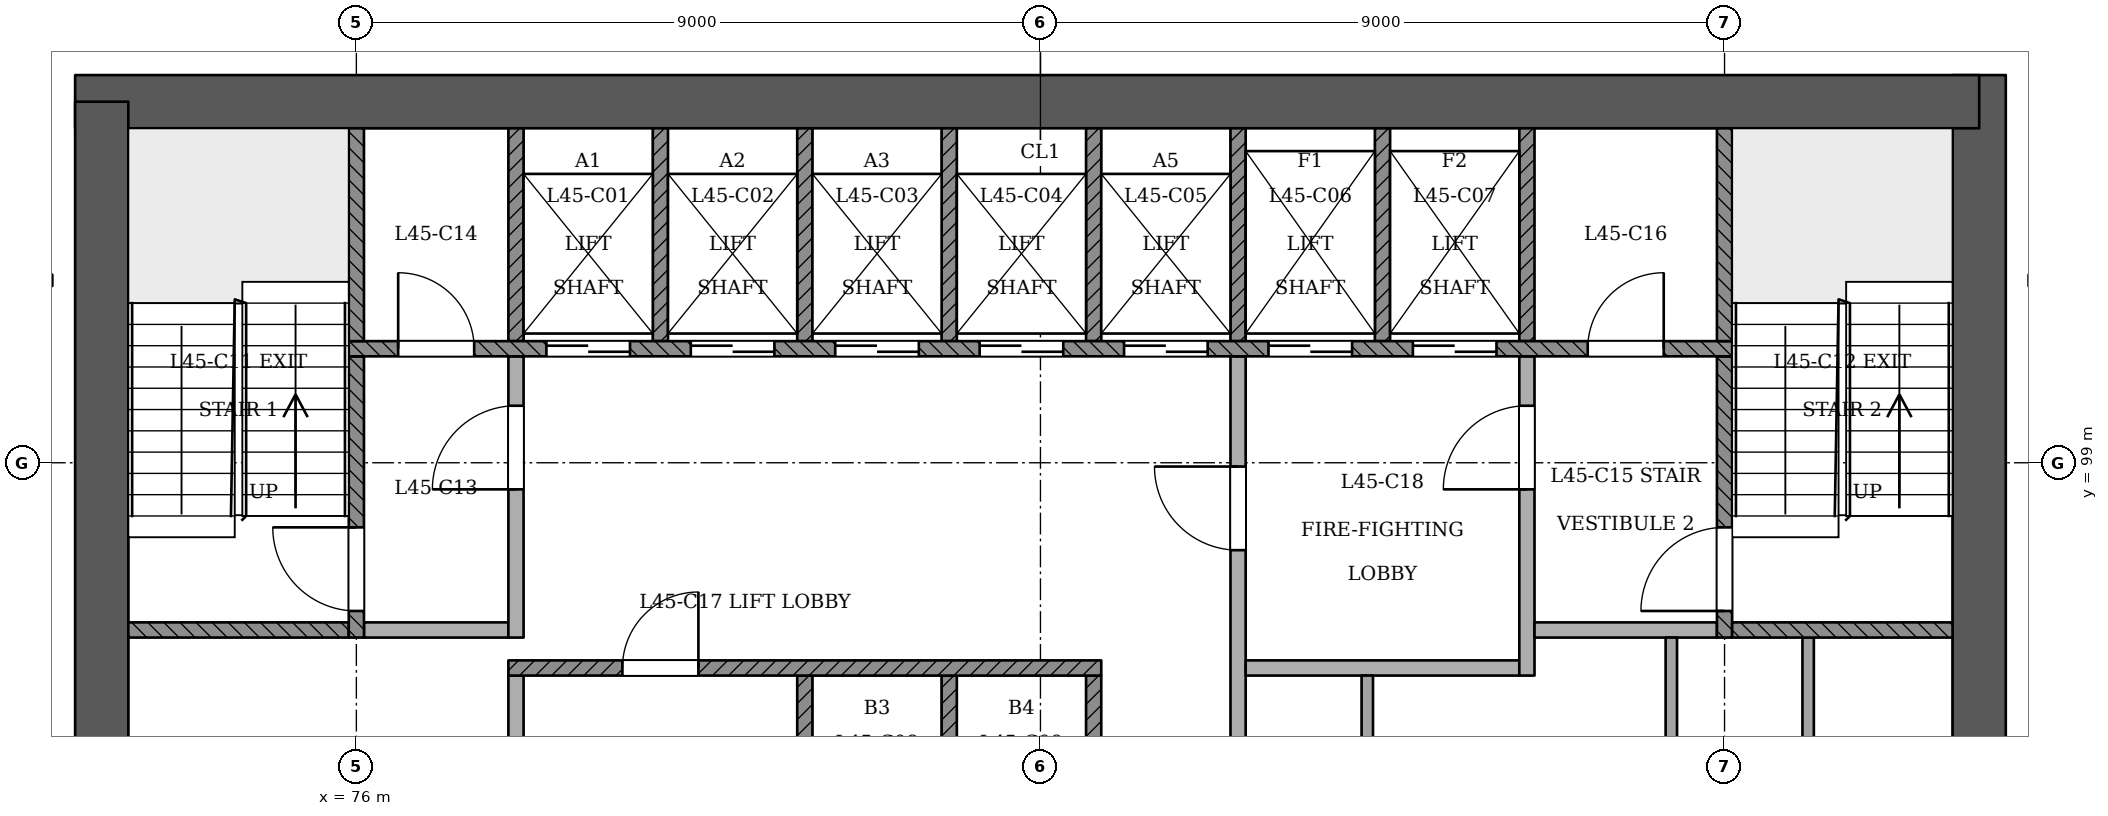
"""IFC4 building model, lengths in metres.
Left out: names, types, materials, properties, quantities, classifications, styles, units other than length and angle.
Written with IfcOpenShell. Run it as: python <this file> out.ifc"""

import sys

from ifc_helpers import new_model, si_unit, direction, frame, frame_2d, origin, place, context, subcontext, project, spatial, rectangle, extrude, element, fill, save


model = new_model("IFC4")
c1 = context("Model", 3, precision=1e-05, world=origin(), true_north=direction((0.0, 1.0)))
c2 = subcontext(c1, "Body", "Model", "MODEL_VIEW")
j1 = project(units=[si_unit("LENGTHUNIT", "METRE"), si_unit("PLANEANGLEUNIT", "RADIAN")], contexts=[c1])
p1 = place(None, origin())
s1 = spatial("IfcSite", under=j1, at=p1, CompositionType="ELEMENT")
p2 = place(p1, origin())
s2 = spatial("IfcBuilding", under=s1, at=p2, CompositionType="ELEMENT")
p3 = place(p2, frame((0.0, 0.0, 174.6)))
s3 = spatial("IfcBuildingStorey", under=s2, at=p3, CompositionType="ELEMENT", Elevation=174.6)
p4 = place(p3, frame((97.35, 93.05, 0.0), z_axis=(0.0, 0.0, 1.0), x_axis=(0.0, 1.0, 0.0)))
e1 = element("IfcWall", 1, at=p4, inside=s3, PredefinedType="SHEAR", context=c2, shape_type="SweptSolid", body=[
    extrude(rectangle(XDim=11.05, YDim=0.7, at=frame_2d((5.525, 0.0))), origin(), (0.0, 0.0, 1.0), 3.6),
])
p5 = place(p3, frame((97.35, 103.75, 0.0), z_axis=(0.0, 0.0, 1.0), x_axis=(-1.0, 0.0, 0.0)))
e2 = element("IfcWall", 2, at=p5, inside=s3, PredefinedType="SHEAR", context=c2, shape_type="SweptSolid", body=[
    extrude(rectangle(XDim=25.05, YDim=0.7, at=frame_2d((12.525, 0.0))), origin(), (0.0, 0.0, 1.0), 3.6),
])
p6 = place(p3, frame((72.65, 103.75, 0.0), z_axis=(0.0, 0.0, 1.0), x_axis=(0.0, -1.0, 0.0)))
e3 = element("IfcWall", 3, at=p6, inside=s3, PredefinedType="SHEAR", context=c2, shape_type="SweptSolid", body=[
    extrude(rectangle(XDim=11.05, YDim=0.7, at=frame_2d((5.525, 0.0))), origin(), (0.0, 0.0, 1.0), 3.6),
])
p7 = place(p3, frame((78.1, 93.4, 0.0), z_axis=(0.0, 0.0, 1.0), x_axis=(0.0, 1.0, 0.0)))
e4 = element("IfcWall", 4, at=p7, inside=s3, PredefinedType="PARTITIONING", context=c2, shape_type="SweptSolid", body=[
    extrude(rectangle(XDim=2.8, YDim=0.2, at=frame_2d((1.4, 0.0))), origin(), (0.0, 0.0, 1.0), 3.15),
])
for number, where, z_axis, x_axis in (
    (5, (81.9, 93.4, 0.0), (0.0, 0.0, 1.0), (0.0, 1.0, 0.0)),
    (6, (83.8, 93.4, 0.0), (0.0, 0.0, 1.0), (0.0, 1.0, 0.0)),
    (7, (85.7, 93.4, 0.0), (0.0, 0.0, 1.0), (0.0, 1.0, 0.0)),
):
    element("IfcWall", number, at=place(p3, frame(where, z_axis=z_axis, x_axis=x_axis)), inside=s3, PredefinedType="SOLIDWALL", context=c2, shape_type="SweptSolid", body=[
        extrude(rectangle(XDim=2.8, YDim=0.2, at=frame_2d((1.4, 0.0))), origin(), (0.0, 0.0, 1.0), 3.15),
    ])
p8 = place(p3, frame((87.6, 93.4, 0.0), z_axis=(0.0, 0.0, 1.0), x_axis=(0.0, 1.0, 0.0)))
e8 = element("IfcWall", 8, at=p8, inside=s3, PredefinedType="PARTITIONING", context=c2, shape_type="SweptSolid", body=[
    extrude(rectangle(XDim=7.0, YDim=0.2, at=frame_2d((3.5, 0.0))), origin(), (0.0, 0.0, 1.0), 3.15),
])
p9 = place(p8, frame((4.45, 0.0, 0.0)))
e9 = element("IfcOpeningElement", 9, at=p9, cuts=e8, PredefinedType="OPENING", context=c2, shape_type="SweptSolid", body=[
    extrude(rectangle(XDim=1.1, YDim=2.1, at=frame_2d((0.55, 1.05))), frame((0.0, 0.11, 0.0), z_axis=(0.0, -1.0, 0.0), x_axis=(1.0, 0.0, 0.0)), (0.0, 0.0, 1.0), 0.221),
])
p10 = place(p3, frame((89.3, 93.4, 0.0), z_axis=(0.0, 0.0, 1.0), x_axis=(0.0, 1.0, 0.0)))
e10 = element("IfcWall", 10, at=p10, inside=s3, PredefinedType="PARTITIONING", context=c2, shape_type="SweptSolid", body=[
    extrude(rectangle(XDim=2.8, YDim=0.15, at=frame_2d((1.4, 0.0))), origin(), (0.0, 0.0, 1.0), 3.15),
])
for number, where, z_axis, x_axis in (
    (11, (93.3, 93.4, 0.0), (0.0, 0.0, 1.0), (0.0, 1.0, 0.0)),
    (12, (95.1, 93.4, 0.0), (0.0, 0.0, 1.0), (0.0, 1.0, 0.0)),
):
    element("IfcWall", number, at=place(p3, frame(where, z_axis=z_axis, x_axis=x_axis)), inside=s3, PredefinedType="PARTITIONING", context=c2, shape_type="SweptSolid", body=[
        extrude(rectangle(XDim=3.3, YDim=0.15, at=frame_2d((1.65, 0.0))), origin(), (0.0, 0.0, 1.0), 3.15),
    ])
p11 = place(p3, frame((78.0, 96.3, 0.0), z_axis=(0.0, 0.0, 1.0), x_axis=(1.0, 0.0, 0.0)))
e13 = element("IfcWall", 13, at=p11, inside=s3, PredefinedType="SOLIDWALL", context=c2, shape_type="SweptSolid", body=[
    extrude(rectangle(XDim=7.8, YDim=0.2, at=frame_2d((3.9, 0.0))), origin(), (0.0, 0.0, 1.0), 3.15),
])
p12 = place(p11, frame((1.5, 0.0, 0.0)))
e14 = element("IfcOpeningElement", 14, at=p12, cuts=e13, PredefinedType="OPENING", context=c2, shape_type="SweptSolid", body=[
    extrude(rectangle(XDim=1.0, YDim=2.1, at=frame_2d((0.5, 1.05))), frame((0.0, 0.11, 0.0), z_axis=(0.0, -1.0, 0.0), x_axis=(1.0, 0.0, 0.0)), (0.0, 0.0, 1.0), 0.221),
])
p13 = place(p3, frame((87.7, 96.3, 0.0), z_axis=(0.0, 0.0, 1.0), x_axis=(1.0, 0.0, 0.0)))
e15 = element("IfcWall", 15, at=p13, inside=s3, PredefinedType="PARTITIONING", context=c2, shape_type="SweptSolid", body=[
    extrude(rectangle(XDim=3.6, YDim=0.2, at=frame_2d((1.8, 0.0))), origin(), (0.0, 0.0, 1.0), 3.15),
])
p14 = place(p3, frame((91.4, 96.2, 0.0), z_axis=(0.0, 0.0, 1.0), x_axis=(0.0, 1.0, 0.0)))
e16 = element("IfcWall", 16, at=p14, inside=s3, PredefinedType="PARTITIONING", context=c2, shape_type="SweptSolid", body=[
    extrude(rectangle(XDim=4.2, YDim=0.2, at=frame_2d((2.1, 0.0))), origin(), (0.0, 0.0, 1.0), 3.15),
])
p15 = place(p14, frame((2.45, 0.0, 0.0)))
e17 = element("IfcOpeningElement", 17, at=p15, cuts=e16, PredefinedType="OPENING", context=c2, shape_type="SweptSolid", body=[
    extrude(rectangle(XDim=1.1, YDim=2.1, at=frame_2d((0.55, 1.05))), frame((0.0, 0.11, 0.0), z_axis=(0.0, -1.0, 0.0), x_axis=(1.0, 0.0, 0.0)), (0.0, 0.0, 1.0), 0.221),
])
p16 = place(p3, frame((73.0, 96.8, 0.0), z_axis=(0.0, 0.0, 1.0), x_axis=(1.0, 0.0, 0.0)))
e18 = element("IfcWall", 18, at=p16, inside=s3, PredefinedType="SOLIDWALL", context=c2, shape_type="SweptSolid", body=[
    extrude(rectangle(XDim=2.9, YDim=0.2, at=frame_2d((1.45, 0.0))), origin(), (0.0, 0.0, 1.0), 3.15),
])
p17 = place(p3, frame((76.0, 96.7, 0.0), z_axis=(0.0, 0.0, 1.0), x_axis=(0.0, 1.0, 0.0)))
e19 = element("IfcWall", 19, at=p17, inside=s3, PredefinedType="SOLIDWALL", context=c2, shape_type="SweptSolid", body=[
    extrude(rectangle(XDim=3.7, YDim=0.2, at=frame_2d((1.85, 0.0))), origin(), (0.0, 0.0, 1.0), 3.15),
])
p18 = place(p17, frame((0.35, 0.0, 0.0)))
e20 = element("IfcOpeningElement", 20, at=p18, cuts=e19, PredefinedType="OPENING", context=c2, shape_type="SweptSolid", body=[
    extrude(rectangle(XDim=1.1, YDim=2.1, at=frame_2d((0.55, 1.05))), frame((0.0, 0.11, 0.0), z_axis=(0.0, -1.0, 0.0), x_axis=(1.0, 0.0, 0.0)), (0.0, 0.0, 1.0), 0.221),
])
p19 = place(p3, frame((76.1, 96.8, 0.0), z_axis=(0.0, 0.0, 1.0), x_axis=(1.0, 0.0, 0.0)))
e21 = element("IfcWall", 21, at=p19, inside=s3, PredefinedType="PARTITIONING", context=c2, shape_type="SweptSolid", body=[
    extrude(rectangle(XDim=1.9, YDim=0.2, at=frame_2d((0.95, 0.0))), origin(), (0.0, 0.0, 1.0), 3.15),
])
p20 = place(p3, frame((78.1, 96.7, 0.0), z_axis=(0.0, 0.0, 1.0), x_axis=(0.0, 1.0, 0.0)))
e22 = element("IfcWall", 22, at=p20, inside=s3, PredefinedType="PARTITIONING", context=c2, shape_type="SweptSolid", body=[
    extrude(rectangle(XDim=3.7, YDim=0.2, at=frame_2d((1.85, 0.0))), origin(), (0.0, 0.0, 1.0), 3.15),
])
p21 = place(p20, frame((1.95, 0.0, 0.0)))
e23 = element("IfcOpeningElement", 23, at=p21, cuts=e22, PredefinedType="OPENING", context=c2, shape_type="SweptSolid", body=[
    extrude(rectangle(XDim=1.1, YDim=2.1, at=frame_2d((0.55, 1.05))), frame((0.0, 0.11, 0.0), z_axis=(0.0, -1.0, 0.0), x_axis=(1.0, 0.0, 0.0)), (0.0, 0.0, 1.0), 0.221),
])
p22 = place(p3, frame((91.5, 96.8, 0.0), z_axis=(0.0, 0.0, 1.0), x_axis=(1.0, 0.0, 0.0)))
e24 = element("IfcWall", 24, at=p22, inside=s3, PredefinedType="PARTITIONING", context=c2, shape_type="SweptSolid", body=[
    extrude(rectangle(XDim=2.4, YDim=0.2, at=frame_2d((1.2, 0.0))), origin(), (0.0, 0.0, 1.0), 3.15),
])
p23 = place(p3, frame((94.0, 96.7, 0.0), z_axis=(0.0, 0.0, 1.0), x_axis=(0.0, 1.0, 0.0)))
e25 = element("IfcWall", 25, at=p23, inside=s3, PredefinedType="SOLIDWALL", context=c2, shape_type="SweptSolid", body=[
    extrude(rectangle(XDim=3.7, YDim=0.2, at=frame_2d((1.85, 0.0))), origin(), (0.0, 0.0, 1.0), 3.15),
])
p24 = place(p23, frame((0.35, 0.0, 0.0)))
e26 = element("IfcOpeningElement", 26, at=p24, cuts=e25, PredefinedType="OPENING", context=c2, shape_type="SweptSolid", body=[
    extrude(rectangle(XDim=1.1, YDim=2.1, at=frame_2d((0.55, 1.05))), frame((0.0, 0.11, 0.0), z_axis=(0.0, -1.0, 0.0), x_axis=(1.0, 0.0, 0.0)), (0.0, 0.0, 1.0), 0.221),
])
p25 = place(p3, frame((94.1, 96.8, 0.0), z_axis=(0.0, 0.0, 1.0), x_axis=(1.0, 0.0, 0.0)))
e27 = element("IfcWall", 27, at=p25, inside=s3, PredefinedType="SOLIDWALL", context=c2, shape_type="SweptSolid", body=[
    extrude(rectangle(XDim=2.9, YDim=0.2, at=frame_2d((1.45, 0.0))), origin(), (0.0, 0.0, 1.0), 3.15),
])
p26 = place(p3, frame((75.9, 100.5, 0.0), z_axis=(0.0, 0.0, 1.0), x_axis=(1.0, 0.0, 0.0)))
e28 = element("IfcWall", 28, at=p26, inside=s3, PredefinedType="SOLIDWALL", context=c2, shape_type="SweptSolid", body=[
    extrude(rectangle(XDim=18.2, YDim=0.2, at=frame_2d((9.1, 0.0))), origin(), (0.0, 0.0, 1.0), 3.15),
])
p27 = place(p26, frame((2.6, 0.0, 0.0)))
e29 = element("IfcOpeningElement", 29, at=p27, cuts=e28, PredefinedType="OPENING", context=c2, shape_type="SweptSolid", body=[
    extrude(rectangle(XDim=1.1, YDim=2.1, at=frame_2d((0.55, 1.05))), frame((0.0, 0.11, 0.0), z_axis=(0.0, -1.0, 0.0), x_axis=(1.0, 0.0, 0.0)), (0.0, 0.0, 1.0), 0.221),
])
p28 = place(p26, frame((4.5, 0.0, 0.0)))
e30 = element("IfcOpeningElement", 30, at=p28, cuts=e28, PredefinedType="OPENING", context=c2, shape_type="SweptSolid", body=[
    extrude(rectangle(XDim=1.1, YDim=2.1, at=frame_2d((0.55, 1.05))), frame((0.0, 0.11, 0.0), z_axis=(0.0, -1.0, 0.0), x_axis=(1.0, 0.0, 0.0)), (0.0, 0.0, 1.0), 0.221),
])
p29 = place(p26, frame((6.4, 0.0, 0.0)))
e31 = element("IfcOpeningElement", 31, at=p29, cuts=e28, PredefinedType="OPENING", context=c2, shape_type="SweptSolid", body=[
    extrude(rectangle(XDim=1.1, YDim=2.1, at=frame_2d((0.55, 1.05))), frame((0.0, 0.11, 0.0), z_axis=(0.0, -1.0, 0.0), x_axis=(1.0, 0.0, 0.0)), (0.0, 0.0, 1.0), 0.221),
])
p30 = place(p26, frame((8.3, 0.0, 0.0)))
e32 = element("IfcOpeningElement", 32, at=p30, cuts=e28, PredefinedType="OPENING", context=c2, shape_type="SweptSolid", body=[
    extrude(rectangle(XDim=1.1, YDim=2.1, at=frame_2d((0.55, 1.05))), frame((0.0, 0.11, 0.0), z_axis=(0.0, -1.0, 0.0), x_axis=(1.0, 0.0, 0.0)), (0.0, 0.0, 1.0), 0.221),
])
p31 = place(p26, frame((10.2, 0.0, 0.0)))
e33 = element("IfcOpeningElement", 33, at=p31, cuts=e28, PredefinedType="OPENING", context=c2, shape_type="SweptSolid", body=[
    extrude(rectangle(XDim=1.1, YDim=2.1, at=frame_2d((0.55, 1.05))), frame((0.0, 0.11, 0.0), z_axis=(0.0, -1.0, 0.0), x_axis=(1.0, 0.0, 0.0)), (0.0, 0.0, 1.0), 0.221),
])
p32 = place(p26, frame((12.1, 0.0, 0.0)))
e34 = element("IfcOpeningElement", 34, at=p32, cuts=e28, PredefinedType="OPENING", context=c2, shape_type="SweptSolid", body=[
    extrude(rectangle(XDim=1.1, YDim=2.1, at=frame_2d((0.55, 1.05))), frame((0.0, 0.11, 0.0), z_axis=(0.0, -1.0, 0.0), x_axis=(1.0, 0.0, 0.0)), (0.0, 0.0, 1.0), 0.221),
])
p33 = place(p26, frame((14.0, 0.0, 0.0)))
e35 = element("IfcOpeningElement", 35, at=p33, cuts=e28, PredefinedType="OPENING", context=c2, shape_type="SweptSolid", body=[
    extrude(rectangle(XDim=1.1, YDim=2.1, at=frame_2d((0.55, 1.05))), frame((0.0, 0.11, 0.0), z_axis=(0.0, -1.0, 0.0), x_axis=(1.0, 0.0, 0.0)), (0.0, 0.0, 1.0), 0.221),
])
p34 = place(p26, frame((0.65, 0.0, 0.0)))
e36 = element("IfcOpeningElement", 36, at=p34, cuts=e28, PredefinedType="OPENING", context=c2, shape_type="SweptSolid", body=[
    extrude(rectangle(XDim=1.0, YDim=2.1, at=frame_2d((0.5, 1.05))), frame((0.0, 0.11, 0.0), z_axis=(0.0, -1.0, 0.0), x_axis=(1.0, 0.0, 0.0)), (0.0, 0.0, 1.0), 0.221),
])
p35 = place(p26, frame((16.3, 0.0, 0.0)))
e37 = element("IfcOpeningElement", 37, at=p35, cuts=e28, PredefinedType="OPENING", context=c2, shape_type="SweptSolid", body=[
    extrude(rectangle(XDim=1.0, YDim=2.1, at=frame_2d((0.5, 1.05))), frame((0.0, 0.11, 0.0), z_axis=(0.0, -1.0, 0.0), x_axis=(1.0, 0.0, 0.0)), (0.0, 0.0, 1.0), 0.221),
])
for number, where, z_axis, x_axis in (
    (38, (76.0, 100.6, 0.0), (0.0, 0.0, 1.0), (0.0, 1.0, 0.0)),
    (39, (78.1, 100.6, 0.0), (0.0, 0.0, 1.0), (0.0, 1.0, 0.0)),
    (40, (80.0, 100.6, 0.0), (0.0, 0.0, 1.0), (0.0, 1.0, 0.0)),
    (41, (81.9, 100.6, 0.0), (0.0, 0.0, 1.0), (0.0, 1.0, 0.0)),
    (42, (83.8, 100.6, 0.0), (0.0, 0.0, 1.0), (0.0, 1.0, 0.0)),
    (43, (85.7, 100.6, 0.0), (0.0, 0.0, 1.0), (0.0, 1.0, 0.0)),
    (44, (87.6, 100.6, 0.0), (0.0, 0.0, 1.0), (0.0, 1.0, 0.0)),
    (45, (89.5, 100.6, 0.0), (0.0, 0.0, 1.0), (0.0, 1.0, 0.0)),
    (46, (91.4, 100.6, 0.0), (0.0, 0.0, 1.0), (0.0, 1.0, 0.0)),
    (47, (94.0, 100.6, 0.0), (0.0, 0.0, 1.0), (0.0, 1.0, 0.0)),
):
    element("IfcWall", number, at=place(p3, frame(where, z_axis=z_axis, x_axis=x_axis)), inside=s3, PredefinedType="SOLIDWALL", context=c2, shape_type="SweptSolid", body=[
        extrude(rectangle(XDim=2.8, YDim=0.2, at=frame_2d((1.4, 0.0))), origin(), (0.0, 0.0, 1.0), 3.15),
    ])
p36 = place(p27, origin())
e48 = element("IfcDoor", 48, at=p36, inside=s3, OperationType="SLIDING_TO_RIGHT", PredefinedType="NOTDEFINED", context=c2, shape_type="SweptSolid", body=[
    extrude(rectangle(XDim=1.1, YDim=2.1, at=frame_2d((0.55, 1.05))), frame((0.0, 0.025, 0.0), z_axis=(0.0, -1.0, 0.0), x_axis=(1.0, 0.0, 0.0)), (0.0, 0.0, 1.0), 0.05),
])
fill(e29, e48)
p37 = place(p28, origin())
e49 = element("IfcDoor", 49, at=p37, inside=s3, OperationType="SLIDING_TO_LEFT", PredefinedType="NOTDEFINED", context=c2, shape_type="SweptSolid", body=[
    extrude(rectangle(XDim=1.1, YDim=2.1, at=frame_2d((0.55, 1.05))), frame((0.0, 0.025, 0.0), z_axis=(0.0, -1.0, 0.0), x_axis=(1.0, 0.0, 0.0)), (0.0, 0.0, 1.0), 0.05),
])
fill(e30, e49)
p38 = place(p29, origin())
e50 = element("IfcDoor", 50, at=p38, inside=s3, OperationType="SLIDING_TO_RIGHT", PredefinedType="NOTDEFINED", context=c2, shape_type="SweptSolid", body=[
    extrude(rectangle(XDim=1.1, YDim=2.1, at=frame_2d((0.55, 1.05))), frame((0.0, 0.025, 0.0), z_axis=(0.0, -1.0, 0.0), x_axis=(1.0, 0.0, 0.0)), (0.0, 0.0, 1.0), 0.05),
])
fill(e31, e50)
p39 = place(p30, origin())
e51 = element("IfcDoor", 51, at=p39, inside=s3, OperationType="SLIDING_TO_LEFT", PredefinedType="NOTDEFINED", context=c2, shape_type="SweptSolid", body=[
    extrude(rectangle(XDim=1.1, YDim=2.1, at=frame_2d((0.55, 1.05))), frame((0.0, 0.025, 0.0), z_axis=(0.0, -1.0, 0.0), x_axis=(1.0, 0.0, 0.0)), (0.0, 0.0, 1.0), 0.05),
])
fill(e32, e51)
p40 = place(p31, origin())
e52 = element("IfcDoor", 52, at=p40, inside=s3, OperationType="SLIDING_TO_RIGHT", PredefinedType="NOTDEFINED", context=c2, shape_type="SweptSolid", body=[
    extrude(rectangle(XDim=1.1, YDim=2.1, at=frame_2d((0.55, 1.05))), frame((0.0, 0.025, 0.0), z_axis=(0.0, -1.0, 0.0), x_axis=(1.0, 0.0, 0.0)), (0.0, 0.0, 1.0), 0.05),
])
fill(e33, e52)
p41 = place(p32, origin())
e53 = element("IfcDoor", 53, at=p41, inside=s3, OperationType="SLIDING_TO_RIGHT", PredefinedType="NOTDEFINED", context=c2, shape_type="SweptSolid", body=[
    extrude(rectangle(XDim=1.1, YDim=2.1, at=frame_2d((0.55, 1.05))), frame((0.0, 0.025, 0.0), z_axis=(0.0, -1.0, 0.0), x_axis=(1.0, 0.0, 0.0)), (0.0, 0.0, 1.0), 0.05),
])
fill(e34, e53)
p42 = place(p33, origin())
e54 = element("IfcDoor", 54, at=p42, inside=s3, OperationType="SLIDING_TO_LEFT", PredefinedType="NOTDEFINED", context=c2, shape_type="SweptSolid", body=[
    extrude(rectangle(XDim=1.1, YDim=2.1, at=frame_2d((0.55, 1.05))), frame((0.0, 0.025, 0.0), z_axis=(0.0, -1.0, 0.0), x_axis=(1.0, 0.0, 0.0)), (0.0, 0.0, 1.0), 0.05),
])
fill(e35, e54)
p43 = place(p18, origin())
e55 = element("IfcDoor", 55, at=p43, inside=s3, OperationType="SINGLE_SWING_RIGHT", PredefinedType="NOTDEFINED", context=c2, shape_type="SweptSolid", body=[
    extrude(rectangle(XDim=1.1, YDim=2.1, at=frame_2d((0.55, 1.05))), frame((0.0, 0.025, 0.0), z_axis=(0.0, -1.0, 0.0), x_axis=(1.0, 0.0, 0.0)), (0.0, 0.0, 1.0), 0.05),
])
fill(e20, e55)
p44 = place(p24, origin())
e56 = element("IfcDoor", 56, at=p44, inside=s3, OperationType="SINGLE_SWING_LEFT", PredefinedType="NOTDEFINED", context=c2, shape_type="SweptSolid", body=[
    extrude(rectangle(XDim=1.1, YDim=2.1, at=frame_2d((0.55, 1.05))), frame((0.0, 0.025, 0.0), z_axis=(0.0, -1.0, 0.0), x_axis=(1.0, 0.0, 0.0)), (0.0, 0.0, 1.0), 0.05),
])
fill(e26, e56)
p45 = place(p21, origin())
e57 = element("IfcDoor", 57, at=p45, inside=s3, OperationType="SINGLE_SWING_LEFT", PredefinedType="NOTDEFINED", context=c2, shape_type="SweptSolid", body=[
    extrude(rectangle(XDim=1.1, YDim=2.1, at=frame_2d((0.55, 1.05))), frame((0.0, 0.025, 0.0), z_axis=(0.0, -1.0, 0.0), x_axis=(1.0, 0.0, 0.0)), (0.0, 0.0, 1.0), 0.05),
])
fill(e23, e57)
p46 = place(p9, origin())
e58 = element("IfcDoor", 58, at=p46, inside=s3, OperationType="SINGLE_SWING_RIGHT", PredefinedType="NOTDEFINED", context=c2, shape_type="SweptSolid", body=[
    extrude(rectangle(XDim=1.1, YDim=2.1, at=frame_2d((0.55, 1.05))), frame((0.0, 0.025, 0.0), z_axis=(0.0, -1.0, 0.0), x_axis=(1.0, 0.0, 0.0)), (0.0, 0.0, 1.0), 0.05),
])
fill(e9, e58)
p47 = place(p15, origin())
e59 = element("IfcDoor", 59, at=p47, inside=s3, OperationType="SINGLE_SWING_LEFT", PredefinedType="NOTDEFINED", context=c2, shape_type="SweptSolid", body=[
    extrude(rectangle(XDim=1.1, YDim=2.1, at=frame_2d((0.55, 1.05))), frame((0.0, 0.025, 0.0), z_axis=(0.0, -1.0, 0.0), x_axis=(1.0, 0.0, 0.0)), (0.0, 0.0, 1.0), 0.05),
])
fill(e17, e59)
p48 = place(p34, origin())
e60 = element("IfcDoor", 60, at=p48, inside=s3, OperationType="SINGLE_SWING_LEFT", PredefinedType="NOTDEFINED", context=c2, shape_type="SweptSolid", body=[
    extrude(rectangle(XDim=1.0, YDim=2.1, at=frame_2d((0.5, 1.05))), frame((0.0, 0.025, 0.0), z_axis=(0.0, -1.0, 0.0), x_axis=(1.0, 0.0, 0.0)), (0.0, 0.0, 1.0), 0.05),
])
fill(e36, e60)
p49 = place(p35, origin())
e61 = element("IfcDoor", 61, at=p49, inside=s3, OperationType="SINGLE_SWING_RIGHT", PredefinedType="NOTDEFINED", context=c2, shape_type="SweptSolid", body=[
    extrude(rectangle(XDim=1.0, YDim=2.1, at=frame_2d((0.5, 1.05))), frame((0.0, 0.025, 0.0), z_axis=(0.0, -1.0, 0.0), x_axis=(1.0, 0.0, 0.0)), (0.0, 0.0, 1.0), 0.05),
])
fill(e37, e61)
p50 = place(p12, origin())
e62 = element("IfcDoor", 62, at=p50, inside=s3, OperationType="SINGLE_SWING_RIGHT", PredefinedType="NOTDEFINED", context=c2, shape_type="SweptSolid", body=[
    extrude(rectangle(XDim=1.0, YDim=2.1, at=frame_2d((0.5, 1.05))), frame((0.0, 0.025, 0.0), z_axis=(0.0, -1.0, 0.0), x_axis=(1.0, 0.0, 0.0)), (0.0, 0.0, 1.0), 0.05),
])
fill(e14, e62)
save(model, sys.argv[1])
